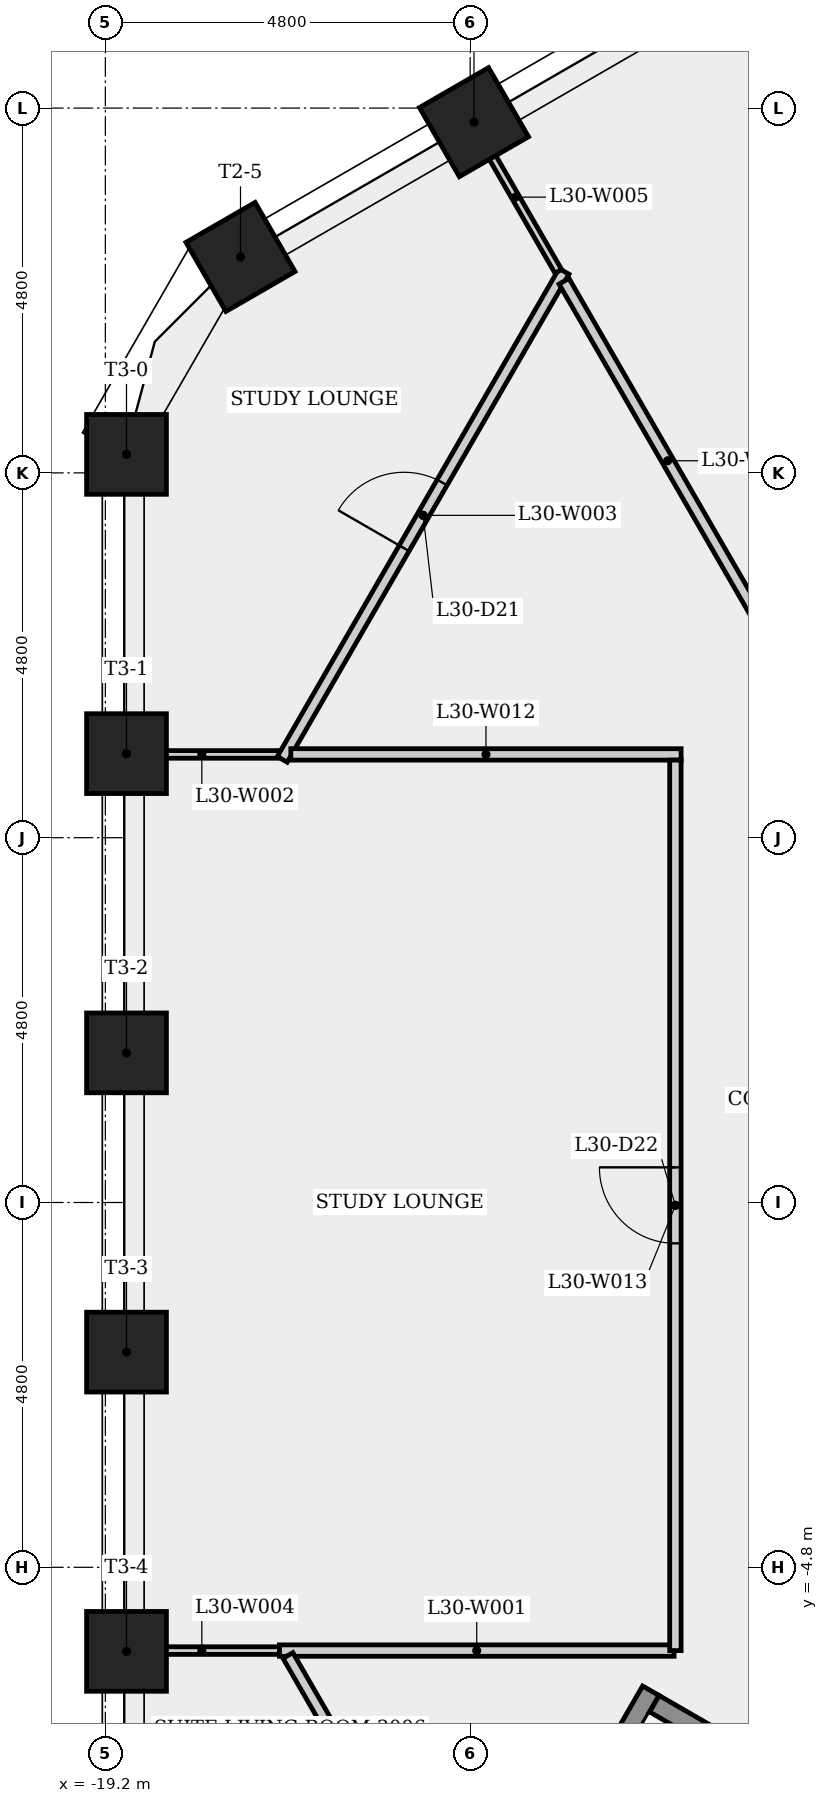
"""IFC4 building model, lengths in metres.
Left out: names, types, materials, properties, quantities, classifications, styles, units other than length and angle.
Written with IfcOpenShell. Run it as: python <this file> out.ifc"""

import sys

from ifc_helpers import new_model, si_unit, direction, frame, frame_2d, origin, origin_2d, place, context, subcontext, project, spatial, rectangle, extrude, element, fill, save


model = new_model("IFC4")
c1 = context("Model", 3, precision=1e-05, world=origin(), true_north=direction((0.0, 1.0)))
c2 = subcontext(c1, "Body", "Model", "MODEL_VIEW")
j1 = project(units=[si_unit("LENGTHUNIT", "METRE"), si_unit("PLANEANGLEUNIT", "RADIAN")], contexts=[c1])
p1 = place(None, origin())
s1 = spatial("IfcSite", under=j1, at=p1, CompositionType="ELEMENT")
p2 = place(p1, origin())
s2 = spatial("IfcBuilding", under=s1, at=p2, CompositionType="ELEMENT")
p3 = place(p2, frame((0.0, 0.0, 113.7)))
s3 = spatial("IfcBuildingStorey", under=s2, at=p3, CompositionType="ELEMENT", Elevation=113.7)
for number, where, z_axis, x_axis in (
    (1, (-14.35, 14.215, 0.0), (0.0, 0.0, 1.0), (-0.5, 0.866, 0.0)),
    (2, (-17.422, 12.442, 0.0), (0.0, 0.0, 1.0), (-0.5, 0.866, 0.0)),
    (3, (-18.922, 9.844, 0.0), (0.0, 0.0, 1.0), (-1.0, 0.0, 0.0)),
    (4, (-18.922, 5.906, 0.0), (0.0, 0.0, 1.0), (-1.0, 0.0, 0.0)),
    (5, (-18.922, 1.969, 0.0), (0.0, 0.0, 1.0), (-1.0, 0.0, 0.0)),
    (6, (-18.922, -1.969, 0.0), (0.0, 0.0, 1.0), (-1.0, 0.0, 0.0)),
    (7, (-18.922, -5.906, 0.0), (0.0, 0.0, 1.0), (-1.0, 0.0, 0.0)),
):
    element("IfcColumn", number, at=place(p3, frame(where, z_axis=z_axis, x_axis=x_axis)), inside=s3, PredefinedType="COLUMN", context=c2, shape_type="SweptSolid", body=[
        extrude(rectangle(XDim=1.05, YDim=1.05, at=origin_2d()), origin(), (0.0, 0.0, 1.0), 3.4),
    ])
p4 = place(p3, frame((-16.91, -5.896, 0.0), z_axis=(0.0, 0.0, 1.0), x_axis=(1.0, 0.0, 0.0)))
e8 = element("IfcWall", 8, at=p4, inside=s3, PredefinedType="PARTITIONING", context=c2, shape_type="SweptSolid", body=[
    extrude(rectangle(XDim=5.192, YDim=0.15, at=frame_2d((2.596, 0.0))), origin(), (0.0, 0.0, 1.0), 3.05),
])
p5 = place(p3, frame((-16.91, 5.896, 0.0), z_axis=(0.0, 0.0, 1.0), x_axis=(-1.0, 0.0, 0.0)))
e9 = element("IfcWall", 9, at=p5, inside=s3, PredefinedType="PARTITIONING", context=c2, shape_type="SweptSolid", body=[
    extrude(rectangle(XDim=2.041, YDim=0.1, at=frame_2d((1.021, 0.0))), origin(), (0.0, 0.0, 1.0), 3.05),
])
p6 = place(p3, frame((-16.873, 5.831, 0.0), z_axis=(0.0, 0.0, 1.0), x_axis=(0.499992292652, 0.866029853578, 0.0)))
e10 = element("IfcWall", 10, at=p6, inside=s3, PredefinedType="PARTITIONING", context=c2, shape_type="SweptSolid", body=[
    extrude(rectangle(XDim=7.414, YDim=0.15, at=frame_2d((3.707, 0.0))), origin(), (0.0, 0.0, 1.0), 3.05),
])
p7 = place(p6, frame((3.207, 0.0, 0.0)))
e11 = element("IfcOpeningElement", 11, at=p7, cuts=e10, PredefinedType="OPENING", context=c2, shape_type="SweptSolid", body=[
    extrude(rectangle(XDim=1.0, YDim=2.1, at=frame_2d((0.5, 1.05))), frame((0.0, 0.085, 0.0), z_axis=(0.0, -1.0, 0.0), x_axis=(1.0, 0.0, 0.0)), (0.0, 0.0, 1.0), 0.17),
])
p8 = place(p3, frame((-16.91, -5.896, 0.0), z_axis=(0.0, 0.0, 1.0), x_axis=(-1.0, 0.0, 0.0)))
e12 = element("IfcWall", 12, at=p8, inside=s3, PredefinedType="PARTITIONING", context=c2, shape_type="SweptSolid", body=[
    extrude(rectangle(XDim=2.042, YDim=0.1, at=frame_2d((1.021, 0.0))), origin(), (0.0, 0.0, 1.0), 3.05),
])
p9 = place(p3, frame((-14.368, 14.205, 0.0), z_axis=(0.0, 0.0, 1.0), x_axis=(0.499981745636, -0.86603594269, 0.0)))
e13 = element("IfcWall", 13, at=p9, inside=s3, PredefinedType="PARTITIONING", context=c2, shape_type="SweptSolid", body=[
    extrude(rectangle(XDim=2.255, YDim=0.1, at=frame_2d((1.127, 0.0))), origin(), (0.0, 0.0, 1.0), 3.05),
])
p10 = place(p3, frame((-14.239, -10.393, 0.0), z_axis=(0.0, 0.0, 1.0), x_axis=(-0.499977120269, 0.866038613, 0.0)))
e14 = element("IfcWall", 14, at=p10, inside=s3, PredefinedType="PARTITIONING", context=c2, shape_type="SweptSolid", body=[
    extrude(rectangle(XDim=5.117, YDim=0.15, at=frame_2d((2.559, 0.0))), origin(), (0.0, 0.0, 1.0), 3.05),
])
p11 = place(p10, frame((2.114, 0.0, 0.0)))
e15 = element("IfcOpeningElement", 15, at=p11, cuts=e14, PredefinedType="OPENING", context=c2, shape_type="SweptSolid", body=[
    extrude(rectangle(XDim=1.0, YDim=2.1, at=frame_2d((0.5, 1.05))), frame((0.0, 0.085, 0.0), z_axis=(0.0, -1.0, 0.0), x_axis=(1.0, 0.0, 0.0)), (0.0, 0.0, 1.0), 0.17),
])
p12 = place(p3, frame((-13.648, -9.239, 0.0), z_axis=(0.0, 0.0, 1.0), x_axis=(0.500017246033, 0.866015446554, 0.0)))
e16 = element("IfcWall", 16, at=p12, inside=s3, PredefinedType="SHEAR", context=c2, shape_type="SweptSolid", body=[
    extrude(rectangle(XDim=3.25, YDim=0.25, at=frame_2d((1.625, 0.0))), origin(), (0.0, 0.0, 1.0), 3.05),
])
p13 = place(p3, frame((-13.166, 12.122, 0.0), z_axis=(0.0, 0.0, 1.0), x_axis=(0.500003946727, -0.866023125129, 0.0)))
e17 = element("IfcWall", 17, at=p13, inside=s3, PredefinedType="PARTITIONING", context=c2, shape_type="SweptSolid", body=[
    extrude(rectangle(XDim=5.456, YDim=0.15, at=frame_2d((2.728, 0.0))), origin(), (0.0, 0.0, 1.0), 3.05),
])
p14 = place(p3, frame((-11.977, -6.595, 0.0), z_axis=(0.0, 0.0, 1.0), x_axis=(0.866025499775, -0.499999833739, 0.0)))
e18 = element("IfcWall", 18, at=p14, inside=s3, PredefinedType="SHEAR", context=c2, shape_type="SweptSolid", body=[
    extrude(rectangle(XDim=6.4, YDim=0.25, at=frame_2d((3.2, 0.0))), origin(), (0.0, 0.0, 1.0), 3.05),
])
p15 = place(p14, frame((5.025, 0.0, 0.0)))
e19 = element("IfcOpeningElement", 19, at=p15, cuts=e18, PredefinedType="OPENING", context=c2, shape_type="SweptSolid", body=[
    extrude(rectangle(XDim=1.0, YDim=2.1, at=frame_2d((0.5, 1.05))), frame((0.0, 0.135, 0.0), z_axis=(0.0, -1.0, 0.0), x_axis=(1.0, 0.0, 0.0)), (0.0, 0.0, 1.0), 0.27),
])
p16 = place(p3, frame((-11.625, 5.896, 0.0), z_axis=(0.0, 0.0, 1.0), x_axis=(-1.0, 0.0, 0.0)))
e20 = element("IfcWall", 20, at=p16, inside=s3, PredefinedType="PARTITIONING", context=c2, shape_type="SweptSolid", body=[
    extrude(rectangle(XDim=5.135, YDim=0.15, at=frame_2d((2.567, 0.0))), origin(), (0.0, 0.0, 1.0), 3.05),
])
p17 = place(p3, frame((-11.7, -5.896, 0.0), z_axis=(0.0, 0.0, 1.0), x_axis=(0.0, 1.0, 0.0)))
e21 = element("IfcWall", 21, at=p17, inside=s3, PredefinedType="PARTITIONING", context=c2, shape_type="SweptSolid", body=[
    extrude(rectangle(XDim=11.717, YDim=0.15, at=frame_2d((5.858, 0.0))), origin(), (0.0, 0.0, 1.0), 3.05),
])
p18 = place(p17, frame((5.358, 0.0, 0.0)))
e22 = element("IfcOpeningElement", 22, at=p18, cuts=e21, PredefinedType="OPENING", context=c2, shape_type="SweptSolid", body=[
    extrude(rectangle(XDim=1.0, YDim=2.1, at=frame_2d((0.5, 1.05))), frame((0.0, 0.085, 0.0), z_axis=(0.0, -1.0, 0.0), x_axis=(1.0, 0.0, 0.0)), (0.0, 0.0, 1.0), 0.17),
])
p19 = place(p7, origin())
e23 = element("IfcDoor", 23, at=p19, inside=s3, OperationType="SINGLE_SWING_LEFT", PredefinedType="DOOR", context=c2, shape_type="SweptSolid", body=[
    extrude(rectangle(XDim=1.0, YDim=2.1, at=frame_2d((0.5, 1.05))), frame((0.0, 0.025, 0.0), z_axis=(0.0, -1.0, 0.0), x_axis=(1.0, 0.0, 0.0)), (0.0, 0.0, 1.0), 0.05),
])
fill(e11, e23)
p20 = place(p18, origin())
e24 = element("IfcDoor", 24, at=p20, inside=s3, OperationType="SINGLE_SWING_RIGHT", PredefinedType="DOOR", context=c2, shape_type="SweptSolid", body=[
    extrude(rectangle(XDim=1.0, YDim=2.1, at=frame_2d((0.5, 1.05))), frame((0.0, 0.025, 0.0), z_axis=(0.0, -1.0, 0.0), x_axis=(1.0, 0.0, 0.0)), (0.0, 0.0, 1.0), 0.05),
])
fill(e22, e24)
save(model, sys.argv[1])
